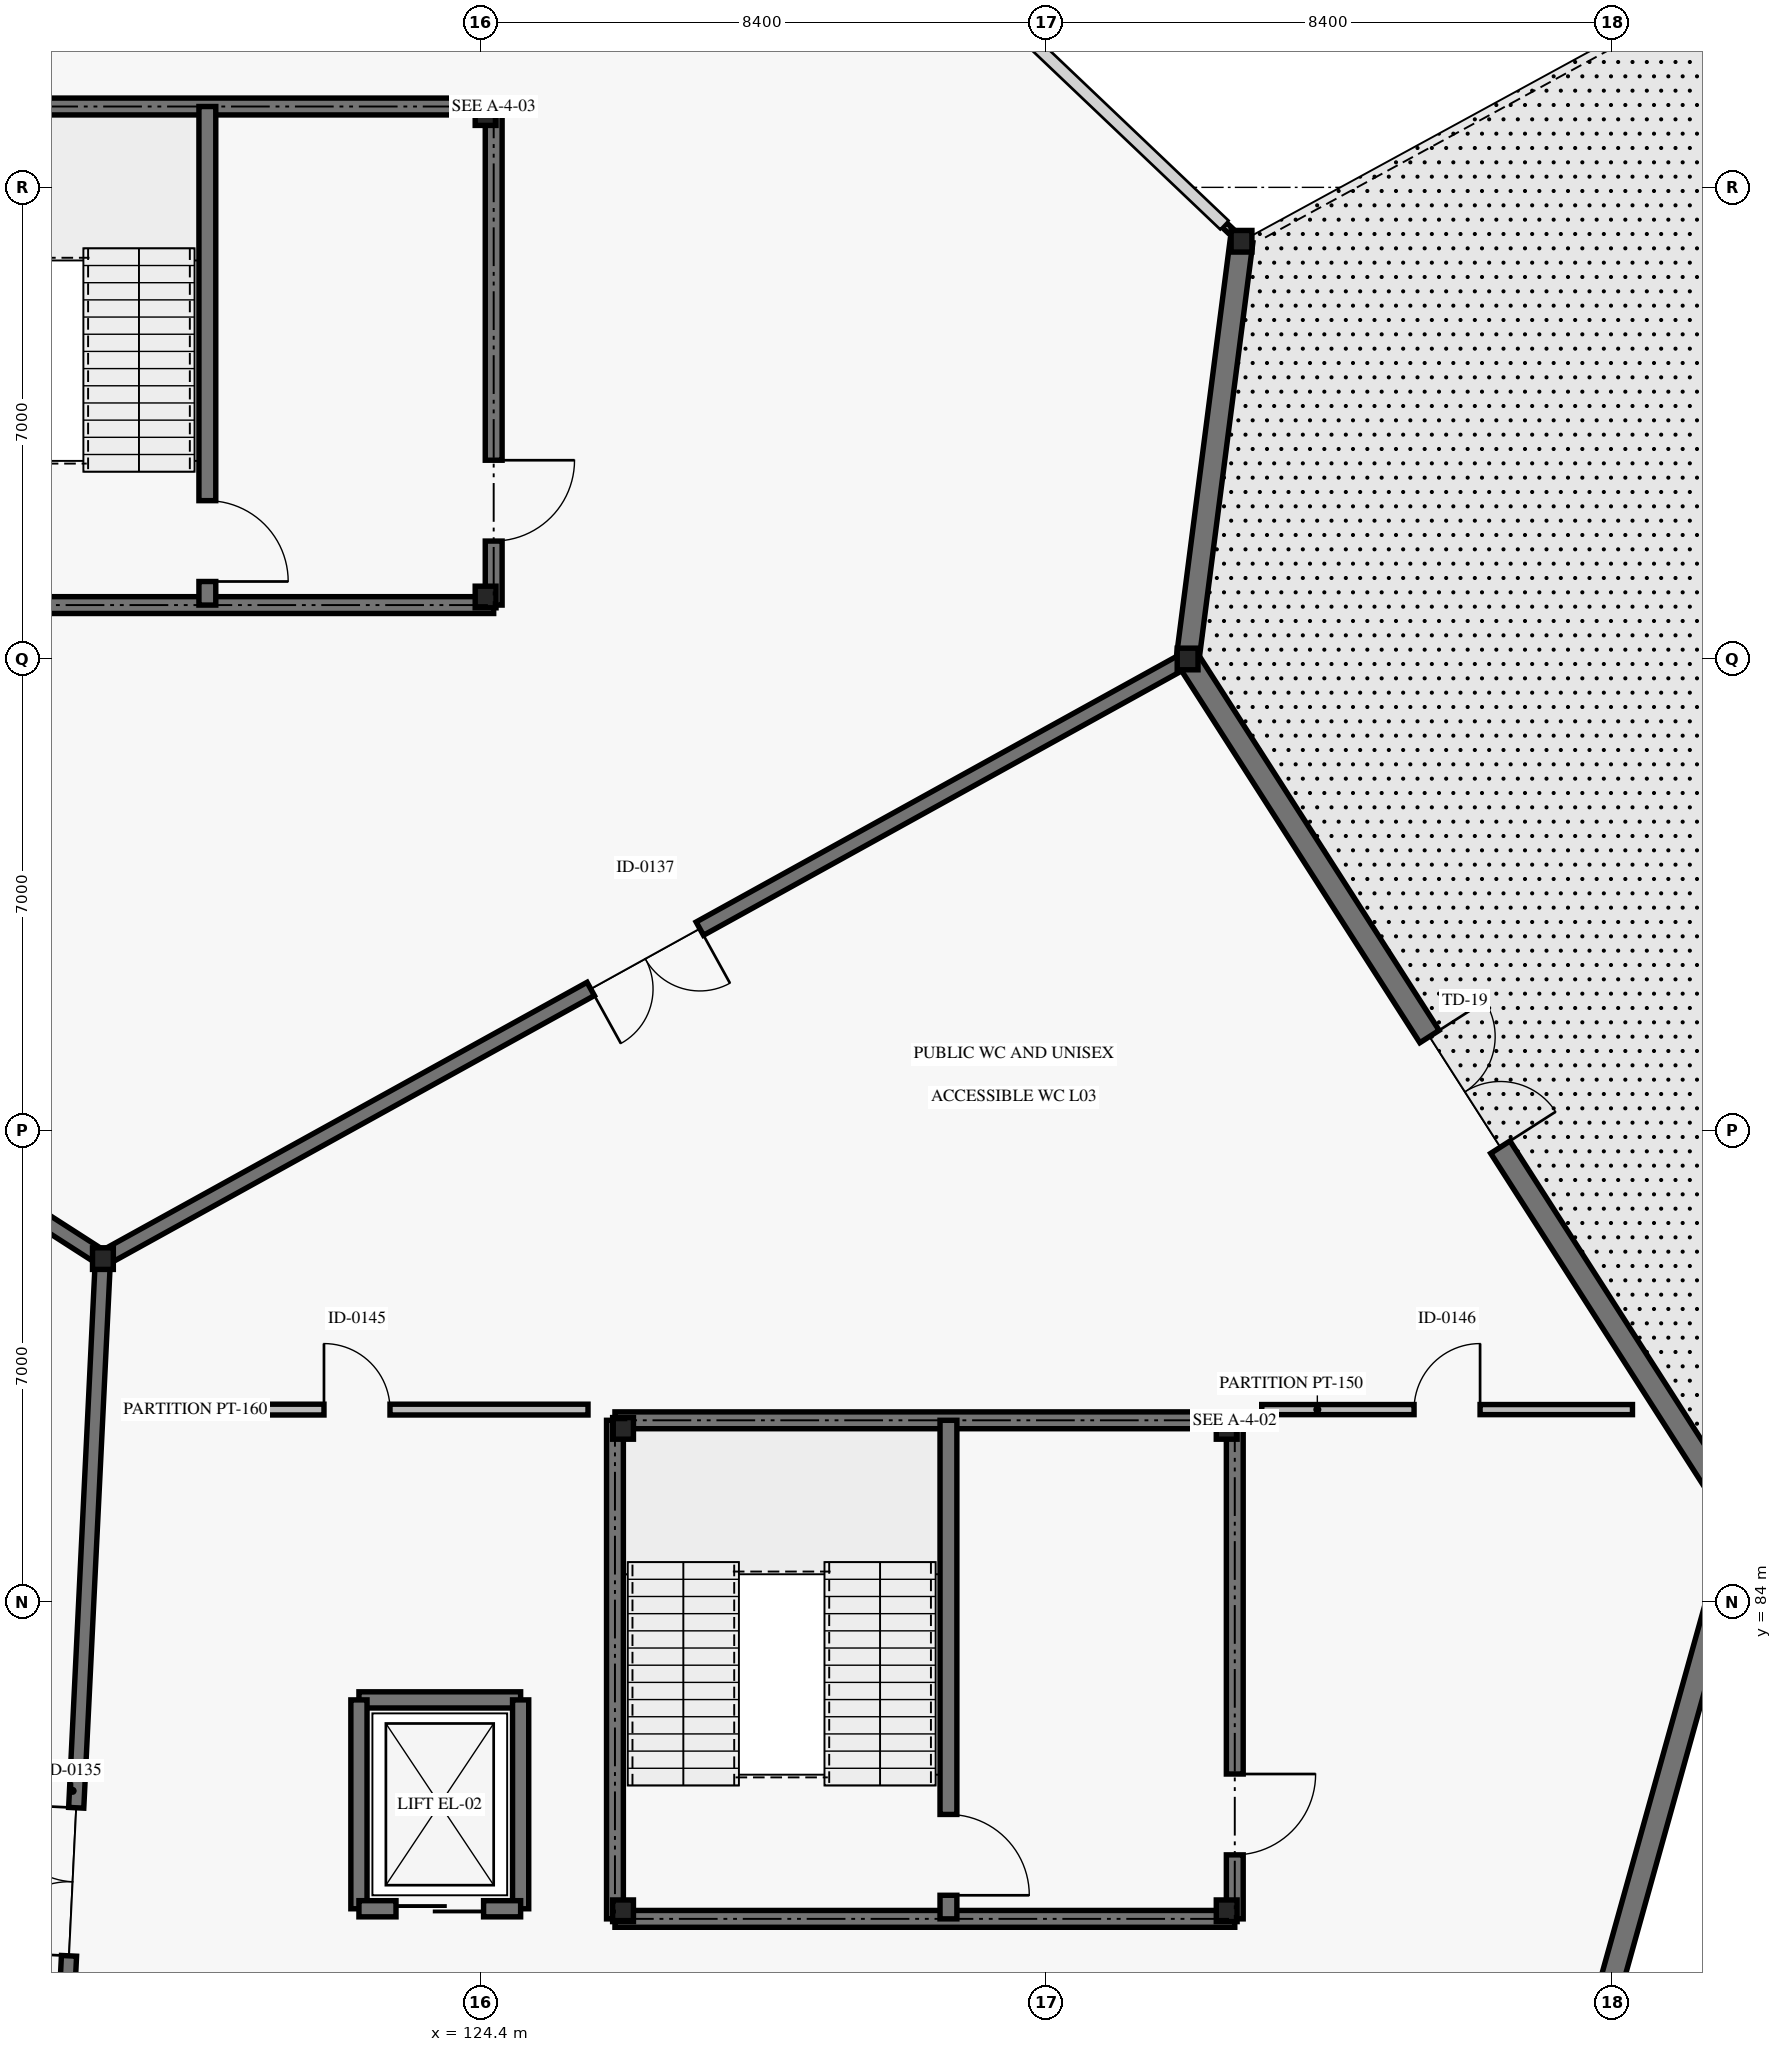
"""IFC4 building model, lengths in metres.
Left out: names, types, materials, properties, quantities, classifications, styles, units other than length and angle.
Written with IfcOpenShell. Run it as: python <this file> out.ifc"""

import sys

from ifc_helpers import new_model, si_unit, direction, frame, frame_2d, origin, origin_2d, place, context, subcontext, project, spatial, rectangle, i_section, extrude, element, fill, save


model = new_model("IFC4")
c1 = context("Model", 3, precision=1e-05, world=origin(), true_north=direction((0.0, 1.0)))
c2 = subcontext(c1, "Body", "Model", "MODEL_VIEW")
j1 = project(units=[si_unit("LENGTHUNIT", "METRE"), si_unit("PLANEANGLEUNIT", "RADIAN")], contexts=[c1])
p1 = place(None, origin())
s1 = spatial("IfcSite", under=j1, at=p1, CompositionType="ELEMENT")
p2 = place(p1, origin())
s2 = spatial("IfcBuilding", under=s1, at=p2, CompositionType="ELEMENT")
p3 = place(p2, frame((0.0, 0.0, 15.0)))
s3 = spatial("IfcBuildingStorey", under=s2, at=p3, CompositionType="ELEMENT", Elevation=15.0)
for number, where, z_axis, x_axis in (
    (1, (118.8, 89.1, 0.0), (0.0, 0.0, 1.0), (1.0, 0.0, 0.0)),
    (2, (134.9, 98.0, 0.0), (0.0, 0.0, 1.0), (1.0, 0.0, 0.0)),
    (3, (135.7, 104.2, 0.0), (0.0, 0.0, 1.0), (1.0, 0.0, 0.0)),
    (4, (126.52, 79.42, 0.0), (0.0, 0.0, 1.0), (1.0, 0.0, 0.0)),
    (5, (135.48, 79.42, 0.0), (0.0, 0.0, 1.0), (1.0, 0.0, 0.0)),
    (6, (135.48, 86.58, 0.0), (0.0, 0.0, 1.0), (1.0, 0.0, 0.0)),
    (7, (126.52, 86.58, 0.0), (0.0, 0.0, 1.0), (1.0, 0.0, 0.0)),
    (8, (124.48, 98.92, 0.0), (0.0, 0.0, 1.0), (1.0, 0.0, 0.0)),
    (9, (124.48, 106.08, 0.0), (0.0, 0.0, 1.0), (1.0, 0.0, 0.0)),
):
    element("IfcColumn", number, at=place(p3, frame(where, z_axis=z_axis, x_axis=x_axis)), inside=s3, PredefinedType="COLUMN", context=c2, shape_type="SweptSolid", body=[
        extrude(i_section(OverallWidth=0.309, OverallDepth=0.321, WebThickness=0.014, FlangeThickness=0.022, FilletRadius=0.017, at=origin_2d()), origin(), (0.0, 0.0, 1.0), 4.8),
    ])
p4 = place(p3, frame((143.1, 85.2, 0.0), z_axis=(0.0, 0.0, 1.0), x_axis=(-0.268807620494, -0.96319388659, 0.0)))
e10 = element("IfcWall", 10, at=p4, inside=s3, PredefinedType="SOLIDWALL", context=c2, shape_type="SweptSolid", body=[
    extrude(rectangle(XDim=13.393, YDim=0.34, at=frame_2d((6.696, 0.0))), origin(), (0.0, 0.0, 1.0), 3.62),
])
p5 = place(p3, frame((134.932, 97.95, 0.0), z_axis=(0.0, 0.0, 1.0), x_axis=(0.539438422375, -0.84202505216, 0.0)))
e11 = element("IfcWall", 11, at=p5, inside=s3, PredefinedType="SOLIDWALL", context=c2, shape_type="SweptSolid", body=[
    extrude(rectangle(XDim=15.142, YDim=0.34, at=frame_2d((7.571, 0.0))), origin(), (0.0, 0.0, 1.0), 3.62),
])
p6 = place(p5, frame((6.596, 0.0, 0.0)))
e12 = element("IfcOpeningElement", 12, at=p6, cuts=e11, PredefinedType="OPENING", context=c2, shape_type="SweptSolid", body=[
    extrude(rectangle(XDim=1.95, YDim=2.3, at=frame_2d((0.975, 1.15))), frame((0.0, 0.18, 0.0), z_axis=(0.0, -1.0, 0.0), x_axis=(1.0, 0.0, 0.0)), (0.0, 0.0, 1.0), 0.36),
])
p7 = place(p3, frame((135.7, 104.2, 0.0), z_axis=(0.0, 0.0, 1.0), x_axis=(-0.127911284164, -0.99178561362, 0.0)))
e13 = element("IfcWall", 13, at=p7, inside=s3, PredefinedType="SOLIDWALL", context=c2, shape_type="SweptSolid", body=[
    extrude(rectangle(XDim=6.192, YDim=0.34, at=frame_2d((3.096, 0.0))), origin(), (0.0, 0.0, 1.0), 3.62),
])
p8 = place(p3, frame((135.446, 104.441, 0.0), z_axis=(0.0, 0.0, 1.0), x_axis=(0.726243974232, -0.687437044311, 0.0)))
e14 = element("IfcWall", 14, at=p8, inside=s3, PredefinedType="SOLIDWALL", context=c2, shape_type="SweptSolid", body=[
    extrude(rectangle(XDim=0.308, YDim=0.095, at=frame_2d((0.154, 0.0))), origin(), (0.0, 0.0, 1.0), 3.62),
])
p9 = place(p3, frame((117.9, 70.6, 0.0), z_axis=(0.0, 0.0, 1.0), x_axis=(0.048599072515, 0.998818366947, 0.0)))
e15 = element("IfcWall", 15, at=p9, inside=s3, PredefinedType="SOLIDWALL", context=c2, shape_type="SweptSolid", body=[
    extrude(rectangle(XDim=18.522, YDim=0.225, at=frame_2d((9.261, 0.0))), origin(), (0.0, 0.0, 1.0), 4.02),
])
p10 = place(p9, frame((8.161, 0.0, 0.0)))
e16 = element("IfcOpeningElement", 16, at=p10, cuts=e15, PredefinedType="OPENING", context=c2, shape_type="SweptSolid", body=[
    extrude(rectangle(XDim=2.2, YDim=2.6, at=frame_2d((1.1, 1.3))), frame((0.0, 0.123, 0.0), z_axis=(0.0, -1.0, 0.0), x_axis=(1.0, 0.0, 0.0)), (0.0, 0.0, 1.0), 0.245),
])
p11 = place(p3, frame((118.8, 89.1, 0.0), z_axis=(0.0, 0.0, 1.0), x_axis=(-0.841183241423, 0.540750177392, 0.0)))
e17 = element("IfcWall", 17, at=p11, inside=s3, PredefinedType="SOLIDWALL", context=c2, shape_type="SweptSolid", body=[
    extrude(rectangle(XDim=18.308, YDim=0.225, at=frame_2d((9.154, 0.0))), origin(), (0.0, 0.0, 1.0), 4.02),
])
p12 = place(p11, frame((8.154, 0.0, 0.0)))
e18 = element("IfcOpeningElement", 18, at=p12, cuts=e17, PredefinedType="OPENING", context=c2, shape_type="SweptSolid", body=[
    extrude(rectangle(XDim=2.0, YDim=2.5, at=frame_2d((1.0, 1.25))), frame((0.0, 0.123, 0.0), z_axis=(0.0, -1.0, 0.0), x_axis=(1.0, 0.0, 0.0)), (0.0, 0.0, 1.0), 0.245),
])
p13 = place(p3, frame((134.9, 98.0, 0.0), z_axis=(0.0, 0.0, 1.0), x_axis=(-0.875181353329, -0.483794996652, 0.0)))
e19 = element("IfcWall", 19, at=p13, inside=s3, PredefinedType="SOLIDWALL", context=c2, shape_type="SweptSolid", body=[
    extrude(rectangle(XDim=18.396, YDim=0.225, at=frame_2d((9.198, 0.0))), origin(), (0.0, 0.0, 1.0), 4.02),
])
p14 = place(p13, frame((8.273, 0.0, 0.0)))
e20 = element("IfcOpeningElement", 20, at=p14, cuts=e19, PredefinedType="OPENING", context=c2, shape_type="SweptSolid", body=[
    extrude(rectangle(XDim=1.85, YDim=2.4, at=frame_2d((0.925, 1.2))), frame((0.0, 0.123, 0.0), z_axis=(0.0, -1.0, 0.0), x_axis=(1.0, 0.0, 0.0)), (0.0, 0.0, 1.0), 0.245),
])
p15 = place(p3, frame((119.142, 86.859, 0.0), z_axis=(0.0, 0.0, 1.0), x_axis=(1.0, 0.0, 0.0)))
e21 = element("IfcWall", 21, at=p15, inside=s3, PredefinedType="PARTITIONING", context=c2, shape_type="SweptSolid", body=[
    extrude(rectangle(XDim=6.858, YDim=0.16, at=frame_2d((3.429, 0.0))), origin(), (0.0, 0.0, 1.0), 3.32),
])
p16 = place(p15, frame((2.939, 0.0, 0.0)))
e22 = element("IfcOpeningElement", 22, at=p16, cuts=e21, PredefinedType="OPENING", context=c2, shape_type="SweptSolid", body=[
    extrude(rectangle(XDim=0.98, YDim=2.15, at=frame_2d((0.49, 1.075))), frame((0.0, 0.09, 0.0), z_axis=(0.0, -1.0, 0.0), x_axis=(1.0, 0.0, 0.0)), (0.0, 0.0, 1.0), 0.18),
])
p17 = place(p3, frame((136.0, 86.859, 0.0), z_axis=(0.0, 0.0, 1.0), x_axis=(1.0, 0.0, 0.0)))
e23 = element("IfcWall", 23, at=p17, inside=s3, PredefinedType="PARTITIONING", context=c2, shape_type="SweptSolid", body=[
    extrude(rectangle(XDim=5.503, YDim=0.15, at=frame_2d((2.751, 0.0))), origin(), (0.0, 0.0, 1.0), 3.32),
])
p18 = place(p17, frame((2.261, 0.0, 0.0)))
e24 = element("IfcOpeningElement", 24, at=p18, cuts=e23, PredefinedType="OPENING", context=c2, shape_type="SweptSolid", body=[
    extrude(rectangle(XDim=0.98, YDim=2.15, at=frame_2d((0.49, 1.075))), frame((0.0, 0.085, 0.0), z_axis=(0.0, -1.0, 0.0), x_axis=(1.0, 0.0, 0.0)), (0.0, 0.0, 1.0), 0.17),
])
p19 = place(p3, frame((126.4, 79.3, 0.0), z_axis=(0.0, 0.0, 1.0), x_axis=(0.0, 1.0, 0.0)))
e25 = element("IfcWall", 25, at=p19, inside=s3, PredefinedType="SHEAR", context=c2, shape_type="SweptSolid", body=[
    extrude(rectangle(XDim=7.4, YDim=0.25, at=frame_2d((3.7, 0.0))), origin(), (0.0, 0.0, 1.0), 4.56),
])
for number, where, z_axis, x_axis in (
    (26, (126.4, 86.7, 0.0), (0.0, 0.0, 1.0), (1.0, 0.0, 0.0)),
    (27, (135.6, 79.3, 0.0), (0.0, 0.0, 1.0), (-1.0, 0.0, 0.0)),
):
    element("IfcWall", number, at=place(p3, frame(where, z_axis=z_axis, x_axis=x_axis)), inside=s3, PredefinedType="SHEAR", context=c2, shape_type="SweptSolid", body=[
        extrude(rectangle(XDim=9.2, YDim=0.25, at=frame_2d((4.6, 0.0))), origin(), (0.0, 0.0, 1.0), 4.56),
    ])
p20 = place(p3, frame((135.6, 86.7, 0.0), z_axis=(0.0, 0.0, 1.0), x_axis=(0.0, -1.0, 0.0)))
e28 = element("IfcWall", 28, at=p20, inside=s3, PredefinedType="SHEAR", context=c2, shape_type="SweptSolid", body=[
    extrude(rectangle(XDim=7.4, YDim=0.25, at=frame_2d((3.7, 0.0))), origin(), (0.0, 0.0, 1.0), 4.56),
])
p21 = place(p20, frame((5.25, 0.0, 0.0)))
e29 = element("IfcOpeningElement", 29, at=p21, cuts=e28, PredefinedType="OPENING", context=c2, shape_type="SweptSolid", body=[
    extrude(rectangle(XDim=1.2, YDim=2.2, at=frame_2d((0.6, 1.1))), frame((0.0, 0.135, 0.0), z_axis=(0.0, -1.0, 0.0), x_axis=(1.0, 0.0, 0.0)), (0.0, 0.0, 1.0), 0.27),
])
p22 = place(p3, frame((131.35, 86.7, 0.0), z_axis=(0.0, 0.0, 1.0), x_axis=(0.0, -1.0, 0.0)))
e30 = element("IfcWall", 30, at=p22, inside=s3, PredefinedType="SHEAR", context=c2, shape_type="SweptSolid", body=[
    extrude(rectangle(XDim=7.4, YDim=0.25, at=frame_2d((3.7, 0.0))), origin(), (0.0, 0.0, 1.0), 4.56),
])
p23 = place(p22, frame((5.85, 0.0, 0.0)))
e31 = element("IfcOpeningElement", 31, at=p23, cuts=e30, PredefinedType="OPENING", context=c2, shape_type="SweptSolid", body=[
    extrude(rectangle(XDim=1.2, YDim=2.2, at=frame_2d((0.6, 1.1))), frame((0.0, 0.135, 0.0), z_axis=(0.0, -1.0, 0.0), x_axis=(1.0, 0.0, 0.0)), (0.0, 0.0, 1.0), 0.27),
])
for number, where, z_axis, x_axis in (
    (32, (115.4, 106.2, 0.0), (0.0, 0.0, 1.0), (1.0, 0.0, 0.0)),
    (33, (124.6, 98.8, 0.0), (0.0, 0.0, 1.0), (-1.0, 0.0, 0.0)),
):
    element("IfcWall", number, at=place(p3, frame(where, z_axis=z_axis, x_axis=x_axis)), inside=s3, PredefinedType="SHEAR", context=c2, shape_type="SweptSolid", body=[
        extrude(rectangle(XDim=9.2, YDim=0.25, at=frame_2d((4.6, 0.0))), origin(), (0.0, 0.0, 1.0), 4.56),
    ])
p24 = place(p3, frame((124.6, 106.2, 0.0), z_axis=(0.0, 0.0, 1.0), x_axis=(0.0, -1.0, 0.0)))
e34 = element("IfcWall", 34, at=p24, inside=s3, PredefinedType="SHEAR", context=c2, shape_type="SweptSolid", body=[
    extrude(rectangle(XDim=7.4, YDim=0.25, at=frame_2d((3.7, 0.0))), origin(), (0.0, 0.0, 1.0), 4.56),
])
p25 = place(p24, frame((5.25, 0.0, 0.0)))
e35 = element("IfcOpeningElement", 35, at=p25, cuts=e34, PredefinedType="OPENING", context=c2, shape_type="SweptSolid", body=[
    extrude(rectangle(XDim=1.2, YDim=2.2, at=frame_2d((0.6, 1.1))), frame((0.0, 0.135, 0.0), z_axis=(0.0, -1.0, 0.0), x_axis=(1.0, 0.0, 0.0)), (0.0, 0.0, 1.0), 0.27),
])
p26 = place(p3, frame((120.35, 106.2, 0.0), z_axis=(0.0, 0.0, 1.0), x_axis=(0.0, -1.0, 0.0)))
e36 = element("IfcWall", 36, at=p26, inside=s3, PredefinedType="SHEAR", context=c2, shape_type="SweptSolid", body=[
    extrude(rectangle(XDim=7.4, YDim=0.25, at=frame_2d((3.7, 0.0))), origin(), (0.0, 0.0, 1.0), 4.56),
])
p27 = place(p26, frame((5.85, 0.0, 0.0)))
e37 = element("IfcOpeningElement", 37, at=p27, cuts=e36, PredefinedType="OPENING", context=c2, shape_type="SweptSolid", body=[
    extrude(rectangle(XDim=1.2, YDim=2.2, at=frame_2d((0.6, 1.1))), frame((0.0, 0.135, 0.0), z_axis=(0.0, -1.0, 0.0), x_axis=(1.0, 0.0, 0.0)), (0.0, 0.0, 1.0), 0.27),
])
p28 = place(p3, frame((122.6, 82.55, 0.0), z_axis=(0.0, 0.0, 1.0), x_axis=(1.0, 0.0, 0.0)))
e38 = element("IfcWall", 38, at=p28, inside=s3, PredefinedType="SHEAR", context=c2, shape_type="SweptSolid", body=[
    extrude(rectangle(XDim=2.4, YDim=0.24, at=frame_2d((1.2, 0.0))), origin(), (0.0, 0.0, 1.0), 4.56),
])
for number, where, z_axis, x_axis in (
    (39, (125.0, 82.55, 0.0), (0.0, 0.0, 1.0), (0.0, -1.0, 0.0)),
    (40, (122.6, 79.45, 0.0), (0.0, 0.0, 1.0), (0.0, 1.0, 0.0)),
):
    element("IfcWall", number, at=place(p3, frame(where, z_axis=z_axis, x_axis=x_axis)), inside=s3, PredefinedType="SHEAR", context=c2, shape_type="SweptSolid", body=[
        extrude(rectangle(XDim=3.1, YDim=0.24, at=frame_2d((1.55, 0.0))), origin(), (0.0, 0.0, 1.0), 4.56),
    ])
p29 = place(p3, frame((125.0, 79.45, 0.0), z_axis=(0.0, 0.0, 1.0), x_axis=(-1.0, 0.0, 0.0)))
e41 = element("IfcWall", 41, at=p29, inside=s3, PredefinedType="SHEAR", context=c2, shape_type="SweptSolid", body=[
    extrude(rectangle(XDim=2.4, YDim=0.24, at=frame_2d((1.2, 0.0))), origin(), (0.0, 0.0, 1.0), 4.56),
])
p30 = place(p29, frame((0.55, 0.0, 0.0)))
e42 = element("IfcOpeningElement", 42, at=p30, cuts=e41, PredefinedType="OPENING", context=c2, shape_type="SweptSolid", body=[
    extrude(rectangle(XDim=1.3, YDim=2.25, at=frame_2d((0.65, 1.125))), frame((0.0, 0.13, 0.0), z_axis=(0.0, -1.0, 0.0), x_axis=(1.0, 0.0, 0.0)), (0.0, 0.0, 1.0), 0.26),
])
p31 = place(p6, origin())
e43 = element("IfcDoor", 43, at=p31, inside=s3, OperationType="DOUBLE_DOOR_SINGLE_SWING", PredefinedType="DOOR", context=c2, shape_type="SweptSolid", body=[
    extrude(rectangle(XDim=1.95, YDim=2.3, at=frame_2d((0.975, 1.15))), frame((0.0, 0.025, 0.0), z_axis=(0.0, -1.0, 0.0), x_axis=(1.0, 0.0, 0.0)), (0.0, 0.0, 1.0), 0.05),
])
fill(e12, e43)
p32 = place(p10, origin())
e44 = element("IfcDoor", 44, at=p32, inside=s3, OperationType="DOUBLE_DOOR_SINGLE_SWING", PredefinedType="DOOR", context=c2, shape_type="SweptSolid", body=[
    extrude(rectangle(XDim=2.2, YDim=2.6, at=frame_2d((1.1, 1.3))), frame((0.0, 0.025, 0.0), z_axis=(0.0, -1.0, 0.0), x_axis=(1.0, 0.0, 0.0)), (0.0, 0.0, 1.0), 0.05),
])
fill(e16, e44)
p33 = place(p14, origin())
e45 = element("IfcDoor", 45, at=p33, inside=s3, OperationType="DOUBLE_DOOR_SINGLE_SWING", PredefinedType="DOOR", context=c2, shape_type="SweptSolid", body=[
    extrude(rectangle(XDim=1.85, YDim=2.4, at=frame_2d((0.925, 1.2))), frame((0.0, 0.025, 0.0), z_axis=(0.0, -1.0, 0.0), x_axis=(1.0, 0.0, 0.0)), (0.0, 0.0, 1.0), 0.05),
])
fill(e20, e45)
p34 = place(p16, origin())
e46 = element("IfcDoor", 46, at=p34, inside=s3, OperationType="SINGLE_SWING_LEFT", PredefinedType="DOOR", context=c2, shape_type="SweptSolid", body=[
    extrude(rectangle(XDim=0.98, YDim=2.15, at=frame_2d((0.49, 1.075))), frame((0.0, 0.025, 0.0), z_axis=(0.0, -1.0, 0.0), x_axis=(1.0, 0.0, 0.0)), (0.0, 0.0, 1.0), 0.05),
])
fill(e22, e46)
p35 = place(p18, origin())
e47 = element("IfcDoor", 47, at=p35, inside=s3, OperationType="SINGLE_SWING_RIGHT", PredefinedType="DOOR", context=c2, shape_type="SweptSolid", body=[
    extrude(rectangle(XDim=0.98, YDim=2.15, at=frame_2d((0.49, 1.075))), frame((0.0, 0.025, 0.0), z_axis=(0.0, -1.0, 0.0), x_axis=(1.0, 0.0, 0.0)), (0.0, 0.0, 1.0), 0.05),
])
fill(e24, e47)
p36 = place(p21, origin())
e48 = element("IfcDoor", 48, at=p36, inside=s3, OperationType="SINGLE_SWING_LEFT", PredefinedType="DOOR", context=c2, shape_type="SweptSolid", body=[
    extrude(rectangle(XDim=1.2, YDim=2.2, at=frame_2d((0.6, 1.1))), frame((0.0, 0.025, 0.0), z_axis=(0.0, -1.0, 0.0), x_axis=(1.0, 0.0, 0.0)), (0.0, 0.0, 1.0), 0.05),
])
fill(e29, e48)
p37 = place(p23, origin())
e49 = element("IfcDoor", 49, at=p37, inside=s3, OperationType="SINGLE_SWING_RIGHT", PredefinedType="DOOR", context=c2, shape_type="SweptSolid", body=[
    extrude(rectangle(XDim=1.2, YDim=2.2, at=frame_2d((0.6, 1.1))), frame((0.0, 0.025, 0.0), z_axis=(0.0, -1.0, 0.0), x_axis=(1.0, 0.0, 0.0)), (0.0, 0.0, 1.0), 0.05),
])
fill(e31, e49)
p38 = place(p25, origin())
e50 = element("IfcDoor", 50, at=p38, inside=s3, OperationType="SINGLE_SWING_LEFT", PredefinedType="DOOR", context=c2, shape_type="SweptSolid", body=[
    extrude(rectangle(XDim=1.2, YDim=2.2, at=frame_2d((0.6, 1.1))), frame((0.0, 0.025, 0.0), z_axis=(0.0, -1.0, 0.0), x_axis=(1.0, 0.0, 0.0)), (0.0, 0.0, 1.0), 0.05),
])
fill(e35, e50)
p39 = place(p27, origin())
e51 = element("IfcDoor", 51, at=p39, inside=s3, OperationType="SINGLE_SWING_RIGHT", PredefinedType="DOOR", context=c2, shape_type="SweptSolid", body=[
    extrude(rectangle(XDim=1.2, YDim=2.2, at=frame_2d((0.6, 1.1))), frame((0.0, 0.025, 0.0), z_axis=(0.0, -1.0, 0.0), x_axis=(1.0, 0.0, 0.0)), (0.0, 0.0, 1.0), 0.05),
])
fill(e37, e51)
p40 = place(p30, origin())
e52 = element("IfcDoor", 52, at=p40, inside=s3, OperationType="SLIDING_TO_LEFT", PredefinedType="DOOR", context=c2, shape_type="SweptSolid", body=[
    extrude(rectangle(XDim=1.3, YDim=2.25, at=frame_2d((0.65, 1.125))), frame((0.0, 0.025, 0.0), z_axis=(0.0, -1.0, 0.0), x_axis=(1.0, 0.0, 0.0)), (0.0, 0.0, 1.0), 0.05),
])
fill(e42, e52)
save(model, sys.argv[1])
